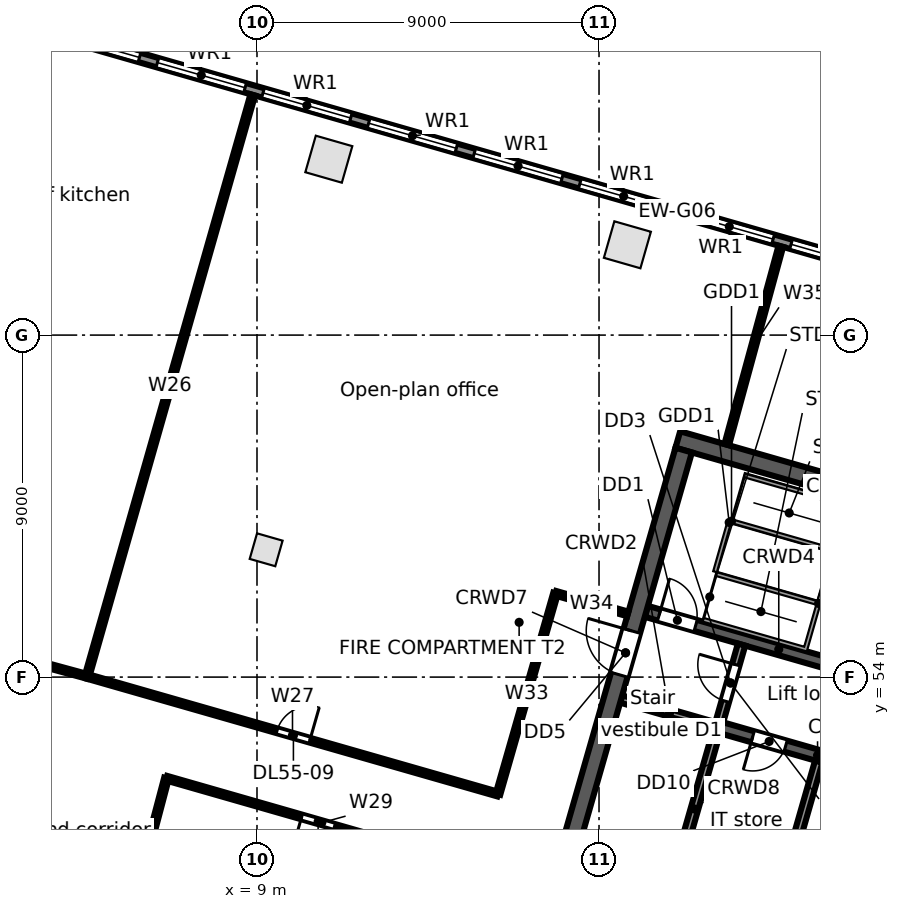
"""IFC4 building model, lengths in metres.
Left out: names, types, materials, properties, quantities, classifications, styles, units other than length and angle.
Written with IfcOpenShell. Run it as: python <this file> out.ifc"""

import sys

from ifc_helpers import new_model, si_unit, direction, frame, frame_2d, origin, origin_2d, place, context, subcontext, project, spatial, rectangle, extrude, element, fill, save


model = new_model("IFC4")
c1 = context("Model", 3, precision=1e-05, world=origin(), true_north=direction((0.0, 1.0)))
c2 = subcontext(c1, "Body", "Model", "MODEL_VIEW")
j1 = project(units=[si_unit("LENGTHUNIT", "METRE"), si_unit("PLANEANGLEUNIT", "RADIAN")], contexts=[c1])
p1 = place(None, origin())
s1 = spatial("IfcSite", under=j1, at=p1, CompositionType="ELEMENT")
p2 = place(p1, origin())
s2 = spatial("IfcBuilding", under=s1, at=p2, CompositionType="ELEMENT")
p3 = place(p2, frame((0.0, 0.0, 250.4)))
s3 = spatial("IfcBuildingStorey", under=s2, at=p3, CompositionType="ELEMENT", Elevation=250.4)
for number, where, z_axis, x_axis in (
    (1, (18.746, 65.376, 0.0), (0.0, 0.0, 1.0), (-0.961, 0.276, 0.0)),
    (2, (10.89, 67.629, 0.0), (0.0, 0.0, 1.0), (-0.961, 0.276, 0.0)),
):
    element("IfcColumn", number, at=place(p3, frame(where, z_axis=z_axis, x_axis=x_axis)), inside=s3, PredefinedType="COLUMN", context=c2, shape_type="SweptSolid", body=[
        extrude(rectangle(XDim=1.0, YDim=1.0, at=origin_2d()), origin(), (0.0, 0.0, 1.0), 3.9),
    ])
p4 = place(p3, frame((9.241, 57.35, 0.0), z_axis=(0.0, 0.0, 1.0), x_axis=(0.961261695938, -0.275637355817, 0.0)))
e3 = element("IfcColumn", 3, at=p4, inside=s3, PredefinedType="COLUMN", context=c2, shape_type="SweptSolid", body=[
    extrude(rectangle(XDim=0.7, YDim=0.7, at=origin_2d()), origin(), (0.0, 0.0, 1.0), 3.9),
])
p5 = place(p3, frame((3.34, 71.042, 0.0), z_axis=(0.0, 0.0, 1.0), x_axis=(0.96126179431, -0.275637012753, 0.0)))
e4 = element("IfcWall", 4, at=p5, inside=s3, PredefinedType="STANDARD", context=c2, shape_type="SweptSolid", body=[
    extrude(rectangle(XDim=34.779, YDim=0.25, at=frame_2d((17.39, 0.0))), origin(), (0.0, 0.0, 1.0), 3.62),
])
p6 = place(p5, frame((32.071, 0.0, 0.8)))
e5 = element("IfcOpeningElement", 5, at=p6, cuts=e4, PredefinedType="OPENING", context=c2, shape_type="SweptSolid", body=[
    extrude(rectangle(XDim=2.4, YDim=2.2, at=frame_2d((1.2, 1.1))), frame((0.0, 0.135, 0.0), z_axis=(0.0, -1.0, 0.0), x_axis=(1.0, 0.0, 0.0)), (0.0, 0.0, 1.0), 0.27),
])
p7 = place(p5, frame((29.18, 0.0, 0.8)))
e6 = element("IfcOpeningElement", 6, at=p7, cuts=e4, PredefinedType="OPENING", context=c2, shape_type="SweptSolid", body=[
    extrude(rectangle(XDim=2.4, YDim=2.2, at=frame_2d((1.2, 1.1))), frame((0.0, 0.135, 0.0), z_axis=(0.0, -1.0, 0.0), x_axis=(1.0, 0.0, 0.0)), (0.0, 0.0, 1.0), 0.27),
])
p8 = place(p5, frame((26.289, 0.0, 0.8)))
e7 = element("IfcOpeningElement", 7, at=p8, cuts=e4, PredefinedType="OPENING", context=c2, shape_type="SweptSolid", body=[
    extrude(rectangle(XDim=2.4, YDim=2.2, at=frame_2d((1.2, 1.1))), frame((0.0, 0.135, 0.0), z_axis=(0.0, -1.0, 0.0), x_axis=(1.0, 0.0, 0.0)), (0.0, 0.0, 1.0), 0.27),
])
p9 = place(p5, frame((23.398, 0.0, 0.8)))
e8 = element("IfcOpeningElement", 8, at=p9, cuts=e4, PredefinedType="OPENING", context=c2, shape_type="SweptSolid", body=[
    extrude(rectangle(XDim=2.4, YDim=2.2, at=frame_2d((1.2, 1.1))), frame((0.0, 0.135, 0.0), z_axis=(0.0, -1.0, 0.0), x_axis=(1.0, 0.0, 0.0)), (0.0, 0.0, 1.0), 0.27),
])
p10 = place(p5, frame((20.508, 0.0, 0.8)))
e9 = element("IfcOpeningElement", 9, at=p10, cuts=e4, PredefinedType="OPENING", context=c2, shape_type="SweptSolid", body=[
    extrude(rectangle(XDim=2.4, YDim=2.2, at=frame_2d((1.2, 1.1))), frame((0.0, 0.135, 0.0), z_axis=(0.0, -1.0, 0.0), x_axis=(1.0, 0.0, 0.0)), (0.0, 0.0, 1.0), 0.27),
])
p11 = place(p5, frame((17.616, 0.0, 0.8)))
e10 = element("IfcOpeningElement", 10, at=p11, cuts=e4, PredefinedType="OPENING", context=c2, shape_type="SweptSolid", body=[
    extrude(rectangle(XDim=2.4, YDim=2.2, at=frame_2d((1.2, 1.1))), frame((0.0, 0.135, 0.0), z_axis=(0.0, -1.0, 0.0), x_axis=(1.0, 0.0, 0.0)), (0.0, 0.0, 1.0), 0.27),
])
p12 = place(p5, frame((14.726, 0.0, 0.8)))
e11 = element("IfcOpeningElement", 11, at=p12, cuts=e4, PredefinedType="OPENING", context=c2, shape_type="SweptSolid", body=[
    extrude(rectangle(XDim=2.4, YDim=2.2, at=frame_2d((1.2, 1.1))), frame((0.0, 0.135, 0.0), z_axis=(0.0, -1.0, 0.0), x_axis=(1.0, 0.0, 0.0)), (0.0, 0.0, 1.0), 0.27),
])
p13 = place(p5, frame((11.834, 0.0, 0.8)))
e12 = element("IfcOpeningElement", 12, at=p13, cuts=e4, PredefinedType="OPENING", context=c2, shape_type="SweptSolid", body=[
    extrude(rectangle(XDim=2.4, YDim=2.2, at=frame_2d((1.2, 1.1))), frame((0.0, 0.135, 0.0), z_axis=(0.0, -1.0, 0.0), x_axis=(1.0, 0.0, 0.0)), (0.0, 0.0, 1.0), 0.27),
])
p14 = place(p5, frame((8.944, 0.0, 0.8)))
e13 = element("IfcOpeningElement", 13, at=p14, cuts=e4, PredefinedType="OPENING", context=c2, shape_type="SweptSolid", body=[
    extrude(rectangle(XDim=2.4, YDim=2.2, at=frame_2d((1.2, 1.1))), frame((0.0, 0.135, 0.0), z_axis=(0.0, -1.0, 0.0), x_axis=(1.0, 0.0, 0.0)), (0.0, 0.0, 1.0), 0.27),
])
p15 = place(p5, frame((6.052, 0.0, 0.8)))
e14 = element("IfcOpeningElement", 14, at=p15, cuts=e4, PredefinedType="OPENING", context=c2, shape_type="SweptSolid", body=[
    extrude(rectangle(XDim=2.4, YDim=2.2, at=frame_2d((1.2, 1.1))), frame((0.0, 0.135, 0.0), z_axis=(0.0, -1.0, 0.0), x_axis=(1.0, 0.0, 0.0)), (0.0, 0.0, 1.0), 0.27),
])
p16 = place(p5, frame((3.162, 0.0, 0.8)))
e15 = element("IfcOpeningElement", 15, at=p16, cuts=e4, PredefinedType="OPENING", context=c2, shape_type="SweptSolid", body=[
    extrude(rectangle(XDim=2.4, YDim=2.2, at=frame_2d((1.2, 1.1))), frame((0.0, 0.135, 0.0), z_axis=(0.0, -1.0, 0.0), x_axis=(1.0, 0.0, 0.0)), (0.0, 0.0, 1.0), 0.27),
])
p17 = place(p5, frame((0.271, 0.0, 0.8)))
e16 = element("IfcOpeningElement", 16, at=p17, cuts=e4, PredefinedType="OPENING", context=c2, shape_type="SweptSolid", body=[
    extrude(rectangle(XDim=2.4, YDim=2.2, at=frame_2d((1.2, 1.1))), frame((0.0, 0.135, 0.0), z_axis=(0.0, -1.0, 0.0), x_axis=(1.0, 0.0, 0.0)), (0.0, 0.0, 1.0), 0.27),
])
p18 = place(p3, frame((18.583, 53.423, 0.0), z_axis=(0.0, 0.0, 1.0), x_axis=(0.961259287968, -0.275645753268, 0.0)))
e17 = element("IfcWall", 17, at=p18, inside=s3, PredefinedType="SOLIDWALL", context=c2, shape_type="SweptSolid", body=[
    extrude(rectangle(XDim=2.65, YDim=0.2, at=frame_2d((1.325, 0.0))), origin(), (0.0, 0.0, 1.0), 3.62),
])
p19 = place(p3, frame((21.131, 52.692, 0.0), z_axis=(0.0, 0.0, 1.0), x_axis=(0.961261488075, -0.275638080722, 0.0)))
e18 = element("IfcWall", 18, at=p19, inside=s3, PredefinedType="SOLIDWALL", context=c2, shape_type="SweptSolid", body=[
    extrude(rectangle(XDim=5.45, YDim=0.3, at=frame_2d((2.725, 0.0))), origin(), (0.0, 0.0, 1.0), 3.62),
])
p20 = place(p19, frame((0.95, 0.0, 0.0)))
e19 = element("IfcOpeningElement", 19, at=p20, cuts=e18, PredefinedType="OPENING", context=c2, shape_type="SweptSolid", body=[
    extrude(rectangle(XDim=0.9, YDim=2.1, at=frame_2d((0.45, 1.05))), frame((0.0, 0.16, 0.0), z_axis=(0.0, -1.0, 0.0), x_axis=(1.0, 0.0, 0.0)), (0.0, 0.0, 1.0), 0.32),
])
p21 = place(p19, frame((3.75, 0.0, 0.0)))
e20 = element("IfcOpeningElement", 20, at=p21, cuts=e18, PredefinedType="OPENING", context=c2, shape_type="SweptSolid", body=[
    extrude(rectangle(XDim=0.9, YDim=2.1, at=frame_2d((0.45, 1.05))), frame((0.0, 0.16, 0.0), z_axis=(0.0, -1.0, 0.0), x_axis=(1.0, 0.0, 0.0)), (0.0, 0.0, 1.0), 0.32),
])
p22 = place(p3, frame((19.245, 55.73, 0.0), z_axis=(0.0, 0.0, 1.0), x_axis=(0.961263007877, -0.275632780503, 0.0)))
e21 = element("IfcWall", 21, at=p22, inside=s3, PredefinedType="SOLIDWALL", context=c2, shape_type="SweptSolid", body=[
    extrude(rectangle(XDim=7.25, YDim=0.3, at=frame_2d((3.625, 0.0))), origin(), (0.0, 0.0, 1.0), 3.62),
])
p23 = place(p22, frame((0.35, 0.0, 0.0)))
e22 = element("IfcOpeningElement", 22, at=p23, cuts=e21, PredefinedType="OPENING", context=c2, shape_type="SweptSolid", body=[
    extrude(rectangle(XDim=1.0, YDim=2.1, at=frame_2d((0.5, 1.05))), frame((0.0, 0.16, 0.0), z_axis=(0.0, -1.0, 0.0), x_axis=(1.0, 0.0, 0.0)), (0.0, 0.0, 1.0), 0.32),
])
p24 = place(p3, frame((20.073, 60.252, 0.0), z_axis=(0.0, 0.0, 1.0), x_axis=(0.96126248289, -0.275634611374, 0.0)))
e23 = element("IfcWall", 23, at=p24, inside=s3, PredefinedType="SOLIDWALL", context=c2, shape_type="SweptSolid", body=[
    extrude(rectangle(XDim=9.0, YDim=0.45, at=frame_2d((4.5, 0.0))), origin(), (0.0, 0.0, 1.0), 3.62),
])
p25 = place(p3, frame((17.168, 49.303, 0.0), z_axis=(0.0, 0.0, 1.0), x_axis=(0.275638974822, 0.961261231695, 0.0)))
e24 = element("IfcWall", 24, at=p25, inside=s3, PredefinedType="SOLIDWALL", context=c2, shape_type="SweptSolid", body=[
    extrude(rectangle(XDim=11.1, YDim=0.45, at=frame_2d((5.55, 0.0))), origin(), (0.0, 0.0, 1.0), 3.62),
])
p26 = place(p25, frame((4.95, 0.0, 0.0)))
e25 = element("IfcOpeningElement", 25, at=p26, cuts=e24, PredefinedType="OPENING", context=c2, shape_type="SweptSolid", body=[
    extrude(rectangle(XDim=1.2, YDim=2.1, at=frame_2d((0.6, 1.05))), frame((0.0, 0.235, 0.0), z_axis=(0.0, -1.0, 0.0), x_axis=(1.0, 0.0, 0.0)), (0.0, 0.0, 1.0), 0.47),
])
p27 = place(p3, frame((19.932, 48.511, 0.0), z_axis=(0.0, 0.0, 1.0), x_axis=(0.275642273411, 0.961260285827, 0.0)))
e26 = element("IfcWall", 26, at=p27, inside=s3, PredefinedType="SOLIDWALL", context=c2, shape_type="SweptSolid", body=[
    extrude(rectangle(XDim=4.2, YDim=0.2, at=frame_2d((2.1, 0.0))), origin(), (0.0, 0.0, 1.0), 3.62),
])
p28 = place(p3, frame((21.172, 52.837, 0.0), z_axis=(0.0, 0.0, 1.0), x_axis=(0.275657676022, 0.961255868981, 0.0)))
e27 = element("IfcWall", 27, at=p28, inside=s3, PredefinedType="PARTITIONING", context=c2, shape_type="SweptSolid", body=[
    extrude(rectangle(XDim=2.1, YDim=0.2, at=frame_2d((1.05, 0.0))), origin(), (0.0, 0.0, 1.0), 3.62),
])
p29 = place(p28, frame((0.55, 0.0, 0.0)))
e28 = element("IfcOpeningElement", 28, at=p29, cuts=e27, PredefinedType="OPENING", context=c2, shape_type="SweptSolid", body=[
    extrude(rectangle(XDim=1.0, YDim=2.1, at=frame_2d((0.5, 1.05))), frame((0.0, 0.11, 0.0), z_axis=(0.0, -1.0, 0.0), x_axis=(1.0, 0.0, 0.0)), (0.0, 0.0, 1.0), 0.22),
])
p30 = place(p3, frame((22.623, 47.739, 0.0), z_axis=(0.0, 0.0, 1.0), x_axis=(0.275642273411, 0.961260285827, 0.0)))
e29 = element("IfcWall", 29, at=p30, inside=s3, PredefinedType="PARTITIONING", context=c2, shape_type="SweptSolid", body=[
    extrude(rectangle(XDim=4.2, YDim=0.2, at=frame_2d((2.1, 0.0))), origin(), (0.0, 0.0, 1.0), 3.62),
])
p31 = place(p3, frame((0.0, 55.25, 0.0), z_axis=(0.0, 0.0, 1.0), x_axis=(0.965016778836, -0.262188132005, 0.0)))
e30 = element("IfcWall", 30, at=p31, inside=s3, PredefinedType="PARTITIONING", context=c2, shape_type="SweptSolid", body=[
    extrude(rectangle(XDim=4.691, YDim=0.125, at=frame_2d((2.346, 0.0))), origin(), (0.0, 0.0, 1.0), 3.62),
])
p32 = place(p31, frame((1.95, 0.0, 0.0)))
e31 = element("IfcOpeningElement", 31, at=p32, cuts=e30, PredefinedType="OPENING", context=c2, shape_type="SweptSolid", body=[
    extrude(rectangle(XDim=0.9, YDim=2.1, at=frame_2d((0.45, 1.05))), frame((0.0, 0.073, 0.0), z_axis=(0.0, -1.0, 0.0), x_axis=(1.0, 0.0, 0.0)), (0.0, 0.0, 1.0), 0.145),
])
p33 = place(p3, frame((4.527, 54.02, 0.0), z_axis=(0.0, 0.0, 1.0), x_axis=(0.274088747086, 0.961704402985, 0.0)))
e32 = element("IfcWall", 32, at=p33, inside=s3, PredefinedType="PARTITIONING", context=c2, shape_type="SweptSolid", body=[
    extrude(rectangle(XDim=15.91, YDim=0.125, at=frame_2d((7.955, 0.0))), origin(), (0.0, 0.0, 1.0), 2.8),
])
p34 = place(p3, frame((4.527, 54.02, 0.0), z_axis=(0.0, 0.0, 1.0), x_axis=(0.961279520283, -0.275575187352, 0.0)))
e33 = element("IfcWall", 33, at=p34, inside=s3, PredefinedType="PARTITIONING", context=c2, shape_type="SweptSolid", body=[
    extrude(rectangle(XDim=11.25, YDim=0.125, at=frame_2d((5.625, 0.0))), origin(), (0.0, 0.0, 1.0), 2.8),
])
p35 = place(p34, frame((5.2, 0.0, 0.0)))
e34 = element("IfcOpeningElement", 34, at=p35, cuts=e33, PredefinedType="OPENING", context=c2, shape_type="SweptSolid", body=[
    extrude(rectangle(XDim=0.9, YDim=2.1, at=frame_2d((0.45, 1.05))), frame((0.0, 0.073, 0.0), z_axis=(0.0, -1.0, 0.0), x_axis=(1.0, 0.0, 0.0)), (0.0, 0.0, 1.0), 0.145),
])
p36 = place(p3, frame((5.364, 46.592, 0.0), z_axis=(0.0, 0.0, 1.0), x_axis=(0.255520885185, 0.966803536006, 0.0)))
e35 = element("IfcWall", 35, at=p36, inside=s3, PredefinedType="PARTITIONING", context=c2, shape_type="SweptSolid", body=[
    extrude(rectangle(XDim=4.911, YDim=0.125, at=frame_2d((2.456, 0.0))), origin(), (0.0, 0.0, 1.0), 2.988),
])
p37 = place(p3, frame((6.619, 51.34, 0.0), z_axis=(0.0, 0.0, 1.0), x_axis=(0.961262314742, -0.275635197782, 0.0)))
e36 = element("IfcWall", 36, at=p37, inside=s3, PredefinedType="PARTITIONING", context=c2, shape_type="SweptSolid", body=[
    extrude(rectangle(XDim=8.5, YDim=0.125, at=frame_2d((4.25, 0.0))), origin(), (0.0, 0.0, 1.0), 2.8),
])
p38 = place(p37, frame((3.7, 0.0, 0.0)))
e37 = element("IfcOpeningElement", 37, at=p38, cuts=e36, PredefinedType="OPENING", context=c2, shape_type="SweptSolid", body=[
    extrude(rectangle(XDim=0.9, YDim=2.1, at=frame_2d((0.45, 1.05))), frame((0.0, 0.073, 0.0), z_axis=(0.0, -1.0, 0.0), x_axis=(1.0, 0.0, 0.0)), (0.0, 0.0, 1.0), 0.145),
])
p39 = place(p3, frame((15.341, 50.92, 0.0), z_axis=(0.0, 0.0, 1.0), x_axis=(0.275653309838, 0.961257121053, 0.0)))
e38 = element("IfcWall", 38, at=p39, inside=s3, PredefinedType="PARTITIONING", context=c2, shape_type="SweptSolid", body=[
    extrude(rectangle(XDim=5.499, YDim=0.125, at=frame_2d((2.75, 0.0))), origin(), (0.0, 0.0, 1.0), 2.8),
])
p40 = place(p3, frame((16.857, 56.206, 0.0), z_axis=(0.0, 0.0, 1.0), x_axis=(0.961383985066, -0.275210525341, 0.0)))
e39 = element("IfcWall", 39, at=p40, inside=s3, PredefinedType="PARTITIONING", context=c2, shape_type="SweptSolid", body=[
    extrude(rectangle(XDim=1.977, YDim=0.125, at=frame_2d((0.988, 0.0))), origin(), (0.0, 0.0, 1.0), 3.62),
])
p41 = place(p3, frame((21.36, 60.117, 0.0), z_axis=(0.0, 0.0, 1.0), x_axis=(0.263151767798, 0.964754449124, 0.0)))
e40 = element("IfcWall", 40, at=p41, inside=s3, PredefinedType="PARTITIONING", context=c2, shape_type="SweptSolid", body=[
    extrude(rectangle(XDim=5.411, YDim=0.125, at=frame_2d((2.705, 0.0))), origin(), (0.0, 0.0, 1.0), 3.0),
])
p42 = place(p10, origin())
e41 = element("IfcWindow", 41, at=p42, inside=s3, PartitioningType="SINGLE_PANEL", PredefinedType="WINDOW", context=c2, shape_type="SweptSolid", body=[
    extrude(rectangle(XDim=2.4, YDim=2.2, at=frame_2d((1.2, 1.1))), frame((0.0, 0.03, 0.0), z_axis=(0.0, -1.0, 0.0), x_axis=(1.0, 0.0, 0.0)), (0.0, 0.0, 1.0), 0.06),
])
fill(e9, e41)
p43 = place(p11, origin())
e42 = element("IfcWindow", 42, at=p43, inside=s3, PartitioningType="SINGLE_PANEL", PredefinedType="WINDOW", context=c2, shape_type="SweptSolid", body=[
    extrude(rectangle(XDim=2.4, YDim=2.2, at=frame_2d((1.2, 1.1))), frame((0.0, 0.03, 0.0), z_axis=(0.0, -1.0, 0.0), x_axis=(1.0, 0.0, 0.0)), (0.0, 0.0, 1.0), 0.06),
])
fill(e10, e42)
p44 = place(p12, origin())
e43 = element("IfcWindow", 43, at=p44, inside=s3, PartitioningType="SINGLE_PANEL", PredefinedType="WINDOW", context=c2, shape_type="SweptSolid", body=[
    extrude(rectangle(XDim=2.4, YDim=2.2, at=frame_2d((1.2, 1.1))), frame((0.0, 0.03, 0.0), z_axis=(0.0, -1.0, 0.0), x_axis=(1.0, 0.0, 0.0)), (0.0, 0.0, 1.0), 0.06),
])
fill(e11, e43)
p45 = place(p13, origin())
e44 = element("IfcWindow", 44, at=p45, inside=s3, PartitioningType="SINGLE_PANEL", PredefinedType="WINDOW", context=c2, shape_type="SweptSolid", body=[
    extrude(rectangle(XDim=2.4, YDim=2.2, at=frame_2d((1.2, 1.1))), frame((0.0, 0.03, 0.0), z_axis=(0.0, -1.0, 0.0), x_axis=(1.0, 0.0, 0.0)), (0.0, 0.0, 1.0), 0.06),
])
fill(e12, e44)
p46 = place(p14, origin())
e45 = element("IfcWindow", 45, at=p46, inside=s3, PartitioningType="SINGLE_PANEL", PredefinedType="WINDOW", context=c2, shape_type="SweptSolid", body=[
    extrude(rectangle(XDim=2.4, YDim=2.2, at=frame_2d((1.2, 1.1))), frame((0.0, 0.03, 0.0), z_axis=(0.0, -1.0, 0.0), x_axis=(1.0, 0.0, 0.0)), (0.0, 0.0, 1.0), 0.06),
])
fill(e13, e45)
p47 = place(p15, origin())
e46 = element("IfcWindow", 46, at=p47, inside=s3, PartitioningType="SINGLE_PANEL", PredefinedType="WINDOW", context=c2, shape_type="SweptSolid", body=[
    extrude(rectangle(XDim=2.4, YDim=2.2, at=frame_2d((1.2, 1.1))), frame((0.0, 0.03, 0.0), z_axis=(0.0, -1.0, 0.0), x_axis=(1.0, 0.0, 0.0)), (0.0, 0.0, 1.0), 0.06),
])
fill(e14, e46)
p48 = place(p16, origin())
e47 = element("IfcWindow", 47, at=p48, inside=s3, PartitioningType="SINGLE_PANEL", PredefinedType="WINDOW", context=c2, shape_type="SweptSolid", body=[
    extrude(rectangle(XDim=2.4, YDim=2.2, at=frame_2d((1.2, 1.1))), frame((0.0, 0.03, 0.0), z_axis=(0.0, -1.0, 0.0), x_axis=(1.0, 0.0, 0.0)), (0.0, 0.0, 1.0), 0.06),
])
fill(e15, e47)
p49 = place(p17, origin())
e48 = element("IfcWindow", 48, at=p49, inside=s3, PartitioningType="SINGLE_PANEL", PredefinedType="WINDOW", context=c2, shape_type="SweptSolid", body=[
    extrude(rectangle(XDim=2.4, YDim=2.2, at=frame_2d((1.2, 1.1))), frame((0.0, 0.03, 0.0), z_axis=(0.0, -1.0, 0.0), x_axis=(1.0, 0.0, 0.0)), (0.0, 0.0, 1.0), 0.06),
])
fill(e16, e48)
p50 = place(p23, origin())
e49 = element("IfcDoor", 49, at=p50, inside=s3, OperationType="SINGLE_SWING_LEFT", PredefinedType="DOOR", context=c2, shape_type="SweptSolid", body=[
    extrude(rectangle(XDim=1.0, YDim=2.1, at=frame_2d((0.5, 1.05))), frame((0.0, 0.025, 0.0), z_axis=(0.0, -1.0, 0.0), x_axis=(1.0, 0.0, 0.0)), (0.0, 0.0, 1.0), 0.05),
])
fill(e22, e49)
p51 = place(p29, origin())
e50 = element("IfcDoor", 50, at=p51, inside=s3, OperationType="SINGLE_SWING_RIGHT", PredefinedType="DOOR", context=c2, shape_type="SweptSolid", body=[
    extrude(rectangle(XDim=1.0, YDim=2.1, at=frame_2d((0.5, 1.05))), frame((0.0, 0.025, 0.0), z_axis=(0.0, -1.0, 0.0), x_axis=(1.0, 0.0, 0.0)), (0.0, 0.0, 1.0), 0.05),
])
fill(e28, e50)
p52 = place(p26, origin())
e51 = element("IfcDoor", 51, at=p52, inside=s3, OperationType="SINGLE_SWING_RIGHT", PredefinedType="DOOR", context=c2, shape_type="SweptSolid", body=[
    extrude(rectangle(XDim=1.2, YDim=2.1, at=frame_2d((0.6, 1.05))), frame((0.0, 0.025, 0.0), z_axis=(0.0, -1.0, 0.0), x_axis=(1.0, 0.0, 0.0)), (0.0, 0.0, 1.0), 0.05),
])
fill(e25, e51)
p53 = place(p20, frame((0.9, 0.0, 0.0), z_axis=(0.0, 0.0, 1.0), x_axis=(-1.0, 0.0, 0.0)))
e52 = element("IfcDoor", 52, at=p53, inside=s3, OperationType="SINGLE_SWING_RIGHT", PredefinedType="DOOR", context=c2, shape_type="SweptSolid", body=[
    extrude(rectangle(XDim=0.9, YDim=2.1, at=frame_2d((0.45, 1.05))), frame((0.0, 0.025, 0.0), z_axis=(0.0, -1.0, 0.0), x_axis=(1.0, 0.0, 0.0)), (0.0, 0.0, 1.0), 0.05),
])
fill(e19, e52)
p54 = place(p35, origin())
e53 = element("IfcDoor", 53, at=p54, inside=s3, OperationType="SINGLE_SWING_RIGHT", PredefinedType="DOOR", context=c2, shape_type="SweptSolid", body=[
    extrude(rectangle(XDim=0.9, YDim=2.1, at=frame_2d((0.45, 1.05))), frame((0.0, 0.025, 0.0), z_axis=(0.0, -1.0, 0.0), x_axis=(1.0, 0.0, 0.0)), (0.0, 0.0, 1.0), 0.05),
])
fill(e34, e53)
p55 = place(p38, frame((0.9, 0.0, 0.0), z_axis=(0.0, 0.0, 1.0), x_axis=(-1.0, 0.0, 0.0)))
e54 = element("IfcDoor", 54, at=p55, inside=s3, OperationType="SINGLE_SWING_RIGHT", PredefinedType="DOOR", context=c2, shape_type="SweptSolid", body=[
    extrude(rectangle(XDim=0.9, YDim=2.1, at=frame_2d((0.45, 1.05))), frame((0.0, 0.025, 0.0), z_axis=(0.0, -1.0, 0.0), x_axis=(1.0, 0.0, 0.0)), (0.0, 0.0, 1.0), 0.05),
])
fill(e37, e54)
save(model, sys.argv[1])
